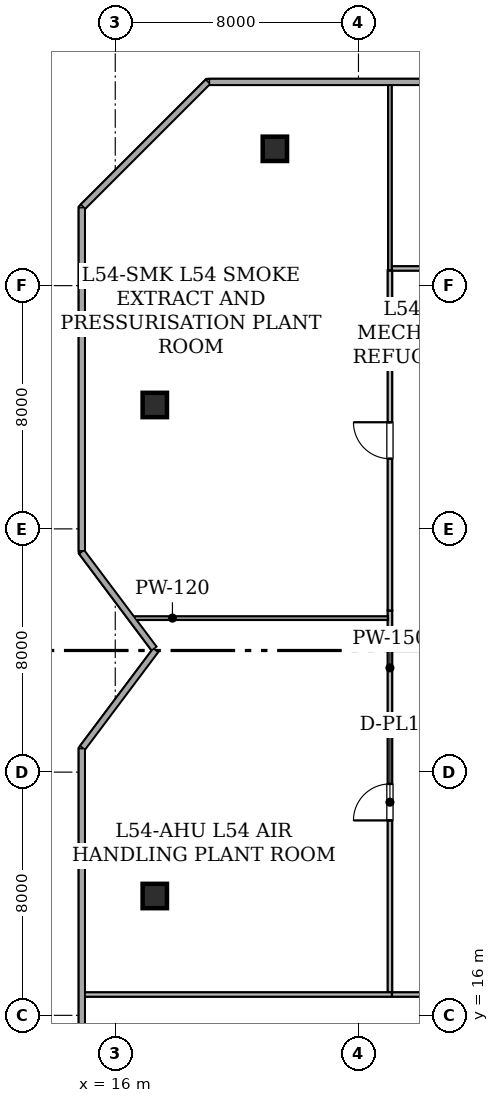
"""IFC4 building model, lengths in metres.
Left out: names, types, materials, properties, quantities, classifications, styles, units other than length and angle.
Written with IfcOpenShell. Run it as: python <this file> out.ifc"""

import sys

from ifc_helpers import new_model, si_unit, direction, frame, frame_2d, origin, origin_2d, place, context, subcontext, project, spatial, rectangle, hollow_rectangle, extrude, element, fill, save


model = new_model("IFC4")
c1 = context("Model", 3, precision=1e-05, world=origin(), true_north=direction((0.0, 1.0)))
c2 = subcontext(c1, "Body", "Model", "MODEL_VIEW")
j1 = project(units=[si_unit("LENGTHUNIT", "METRE"), si_unit("PLANEANGLEUNIT", "RADIAN")], contexts=[c1])
p1 = place(None, origin())
s1 = spatial("IfcSite", under=j1, at=p1, CompositionType="ELEMENT")
p2 = place(p1, origin())
s2 = spatial("IfcBuilding", under=s1, at=p2, CompositionType="ELEMENT")
p3 = place(p2, frame((0.0, 0.0, 211.8)))
s3 = spatial("IfcBuildingStorey", under=s2, at=p3, CompositionType="ELEMENT", Elevation=211.8)
for number, where, z_axis, x_axis in (
    (1, (21.25, 44.5, 0.0), (0.0, 0.0, 1.0), (1.0, 0.0, 0.0)),
    (2, (17.3, 19.925, 0.0), (0.0, 0.0, 1.0), (1.0, 0.0, 0.0)),
    (3, (17.3, 36.075, 0.0), (0.0, 0.0, 1.0), (1.0, 0.0, 0.0)),
):
    element("IfcColumn", number, at=place(p3, frame(where, z_axis=z_axis, x_axis=x_axis)), inside=s3, PredefinedType="COLUMN", context=c2, shape_type="SweptSolid", body=[
        extrude(hollow_rectangle(XDim=0.8, YDim=0.8, WallThickness=0.04, at=origin_2d()), origin(), (0.0, 0.0, 1.0), 5.375),
    ])
p4 = place(p3, frame((14.9, 13.504, 0.0), z_axis=(0.0, 0.0, 1.0), x_axis=(0.0, 1.0, 0.0)))
e4 = element("IfcWall", 4, at=p4, inside=s3, PredefinedType="STANDARD", context=c2, shape_type="SweptSolid", body=[
    extrude(rectangle(XDim=11.263, YDim=0.2, at=frame_2d((5.632, 0.0))), origin(), (0.0, 0.0, 1.0), 1.15),
])
p5 = place(p3, frame((14.93, 24.807, 0.0), z_axis=(0.0, 0.0, 1.0), x_axis=(0.600029358831, 0.799977980035, 0.0)))
e5 = element("IfcWall", 5, at=p5, inside=s3, PredefinedType="STANDARD", context=c2, shape_type="SweptSolid", body=[
    extrude(rectangle(XDim=3.991, YDim=0.2, at=frame_2d((1.996, 0.0))), origin(), (0.0, 0.0, 1.0), 1.15),
])
p6 = place(p3, frame((17.273, 28.069, 0.0), z_axis=(0.0, 0.0, 1.0), x_axis=(-0.600029630681, 0.799977776132, 0.0)))
e6 = element("IfcWall", 6, at=p6, inside=s3, PredefinedType="STANDARD", context=c2, shape_type="SweptSolid", body=[
    extrude(rectangle(XDim=3.955, YDim=0.2, at=frame_2d((1.978, 0.0))), origin(), (0.0, 0.0, 1.0), 1.15),
])
p7 = place(p3, frame((14.9, 31.284, 0.0), z_axis=(0.0, 0.0, 1.0), x_axis=(0.0, 1.0, 0.0)))
e7 = element("IfcWall", 7, at=p7, inside=s3, PredefinedType="STANDARD", context=c2, shape_type="SweptSolid", body=[
    extrude(rectangle(XDim=11.275, YDim=0.2, at=frame_2d((5.638, 0.0))), origin(), (0.0, 0.0, 1.0), 1.15),
])
p8 = place(p3, frame((14.945, 42.604, 0.0), z_axis=(0.0, 0.0, 1.0), x_axis=(0.707106781187, 0.707106781187, 0.0)))
e8 = element("IfcWall", 8, at=p8, inside=s3, PredefinedType="STANDARD", context=c2, shape_type="SweptSolid", body=[
    extrude(rectangle(XDim=5.792, YDim=0.2, at=frame_2d((2.896, 0.0))), origin(), (0.0, 0.0, 1.0), 1.15),
])
p9 = place(p3, frame((19.102, 46.7, 0.0), z_axis=(0.0, 0.0, 1.0), x_axis=(1.0, 0.0, 0.0)))
e9 = element("IfcWall", 9, at=p9, inside=s3, PredefinedType="STANDARD", context=c2, shape_type="SweptSolid", body=[
    extrude(rectangle(XDim=39.857, YDim=0.2, at=frame_2d((19.928, 0.0))), origin(), (0.0, 0.0, 1.0), 1.15),
])
p10 = place(p3, frame((43.8, 16.685, 0.0), z_axis=(0.0, 0.0, 1.0), x_axis=(-1.0, 0.0, 0.0)))
e10 = element("IfcWall", 10, at=p10, inside=s3, PredefinedType="STANDARD", context=c2, shape_type="SweptSolid", body=[
    extrude(rectangle(XDim=18.7, YDim=0.15, at=frame_2d((9.35, 0.0))), origin(), (0.0, 0.0, 1.0), 3.42),
])
p11 = place(p10, frame((8.75, 0.0, 0.0)))
e11 = element("IfcOpeningElement", 11, at=p11, cuts=e10, PredefinedType="OPENING", context=c2, shape_type="SweptSolid", body=[
    extrude(rectangle(XDim=1.2, YDim=2.15, at=frame_2d((0.6, 1.075))), frame((0.0, 0.085, 0.0), z_axis=(0.0, -1.0, 0.0), x_axis=(1.0, 0.0, 0.0)), (0.0, 0.0, 1.0), 0.17),
])
p12 = place(p3, frame((25.035, 16.75, 0.0), z_axis=(0.0, 0.0, 1.0), x_axis=(0.0, 1.0, 0.0)))
e12 = element("IfcWall", 12, at=p12, inside=s3, PredefinedType="STANDARD", context=c2, shape_type="SweptSolid", body=[
    extrude(rectangle(XDim=12.564, YDim=0.15, at=frame_2d((6.282, 0.0))), origin(), (0.0, 0.0, 1.0), 3.42),
])
p13 = place(p12, frame((5.661, 0.0, 0.0)))
e13 = element("IfcOpeningElement", 13, at=p13, cuts=e12, PredefinedType="OPENING", context=c2, shape_type="SweptSolid", body=[
    extrude(rectangle(XDim=1.2, YDim=2.15, at=frame_2d((0.6, 1.075))), frame((0.0, 0.085, 0.0), z_axis=(0.0, -1.0, 0.0), x_axis=(1.0, 0.0, 0.0)), (0.0, 0.0, 1.0), 0.17),
])
p14 = place(p3, frame((25.035, 29.314, 0.0), z_axis=(0.0, 0.0, 1.0), x_axis=(0.0, 1.0, 0.0)))
e14 = element("IfcWall", 14, at=p14, inside=s3, PredefinedType="STANDARD", context=c2, shape_type="SweptSolid", body=[
    extrude(rectangle(XDim=11.186, YDim=0.15, at=frame_2d((5.593, 0.0))), origin(), (0.0, 0.0, 1.0), 3.42),
])
p15 = place(p14, frame((4.993, 0.0, 0.0)))
e15 = element("IfcOpeningElement", 15, at=p15, cuts=e14, PredefinedType="OPENING", context=c2, shape_type="SweptSolid", body=[
    extrude(rectangle(XDim=1.2, YDim=2.15, at=frame_2d((0.6, 1.075))), frame((0.0, 0.085, 0.0), z_axis=(0.0, -1.0, 0.0), x_axis=(1.0, 0.0, 0.0)), (0.0, 0.0, 1.0), 0.17),
])
p16 = place(p3, frame((25.1, 40.565, 0.0), z_axis=(0.0, 0.0, 1.0), x_axis=(1.0, 0.0, 0.0)))
e16 = element("IfcWall", 16, at=p16, inside=s3, PredefinedType="STANDARD", context=c2, shape_type="SweptSolid", body=[
    extrude(rectangle(XDim=18.7, YDim=0.15, at=frame_2d((9.35, 0.0))), origin(), (0.0, 0.0, 1.0), 3.42),
])
p17 = place(p16, frame((8.75, 0.0, 0.0)))
e17 = element("IfcOpeningElement", 17, at=p17, cuts=e16, PredefinedType="OPENING", context=c2, shape_type="SweptSolid", body=[
    extrude(rectangle(XDim=1.2, YDim=2.15, at=frame_2d((0.6, 1.075))), frame((0.0, 0.085, 0.0), z_axis=(0.0, -1.0, 0.0), x_axis=(1.0, 0.0, 0.0)), (0.0, 0.0, 1.0), 0.17),
])
p18 = place(p3, frame((14.992, 16.685, 0.0), z_axis=(0.0, 0.0, 1.0), x_axis=(1.0, 0.0, 0.0)))
e18 = element("IfcWall", 18, at=p18, inside=s3, PredefinedType="STANDARD", context=c2, shape_type="SweptSolid", body=[
    extrude(rectangle(XDim=10.108, YDim=0.15, at=frame_2d((5.054, 0.0))), origin(), (0.0, 0.0, 1.0), 3.42),
])
p19 = place(p3, frame((16.63, 29.065, 0.0), z_axis=(0.0, 0.0, 1.0), x_axis=(1.0, 0.0, 0.0)))
e19 = element("IfcWall", 19, at=p19, inside=s3, PredefinedType="PARTITIONING", context=c2, shape_type="SweptSolid", body=[
    extrude(rectangle(XDim=8.34, YDim=0.12, at=frame_2d((4.17, 0.0))), origin(), (0.0, 0.0, 1.0), 3.42),
])
p20 = place(p3, frame((25.035, 46.608, 0.0), z_axis=(0.0, 0.0, 1.0), x_axis=(0.0, -1.0, 0.0)))
e20 = element("IfcWall", 20, at=p20, inside=s3, PredefinedType="PARTITIONING", context=c2, shape_type="SweptSolid", body=[
    extrude(rectangle(XDim=6.108, YDim=0.12, at=frame_2d((3.054, 0.0))), origin(), (0.0, 0.0, 1.0), 3.42),
])
p21 = place(p13, origin())
e21 = element("IfcDoor", 21, at=p21, inside=s3, OperationType="SINGLE_SWING_LEFT", PredefinedType="DOOR", context=c2, shape_type="SweptSolid", body=[
    extrude(rectangle(XDim=1.2, YDim=2.15, at=frame_2d((0.6, 1.075))), frame((0.0, 0.025, 0.0), z_axis=(0.0, -1.0, 0.0), x_axis=(1.0, 0.0, 0.0)), (0.0, 0.0, 1.0), 0.05),
])
fill(e13, e21)
p22 = place(p15, origin())
e22 = element("IfcDoor", 22, at=p22, inside=s3, OperationType="SINGLE_SWING_RIGHT", PredefinedType="DOOR", context=c2, shape_type="SweptSolid", body=[
    extrude(rectangle(XDim=1.2, YDim=2.15, at=frame_2d((0.6, 1.075))), frame((0.0, 0.025, 0.0), z_axis=(0.0, -1.0, 0.0), x_axis=(1.0, 0.0, 0.0)), (0.0, 0.0, 1.0), 0.05),
])
fill(e15, e22)
save(model, sys.argv[1])
